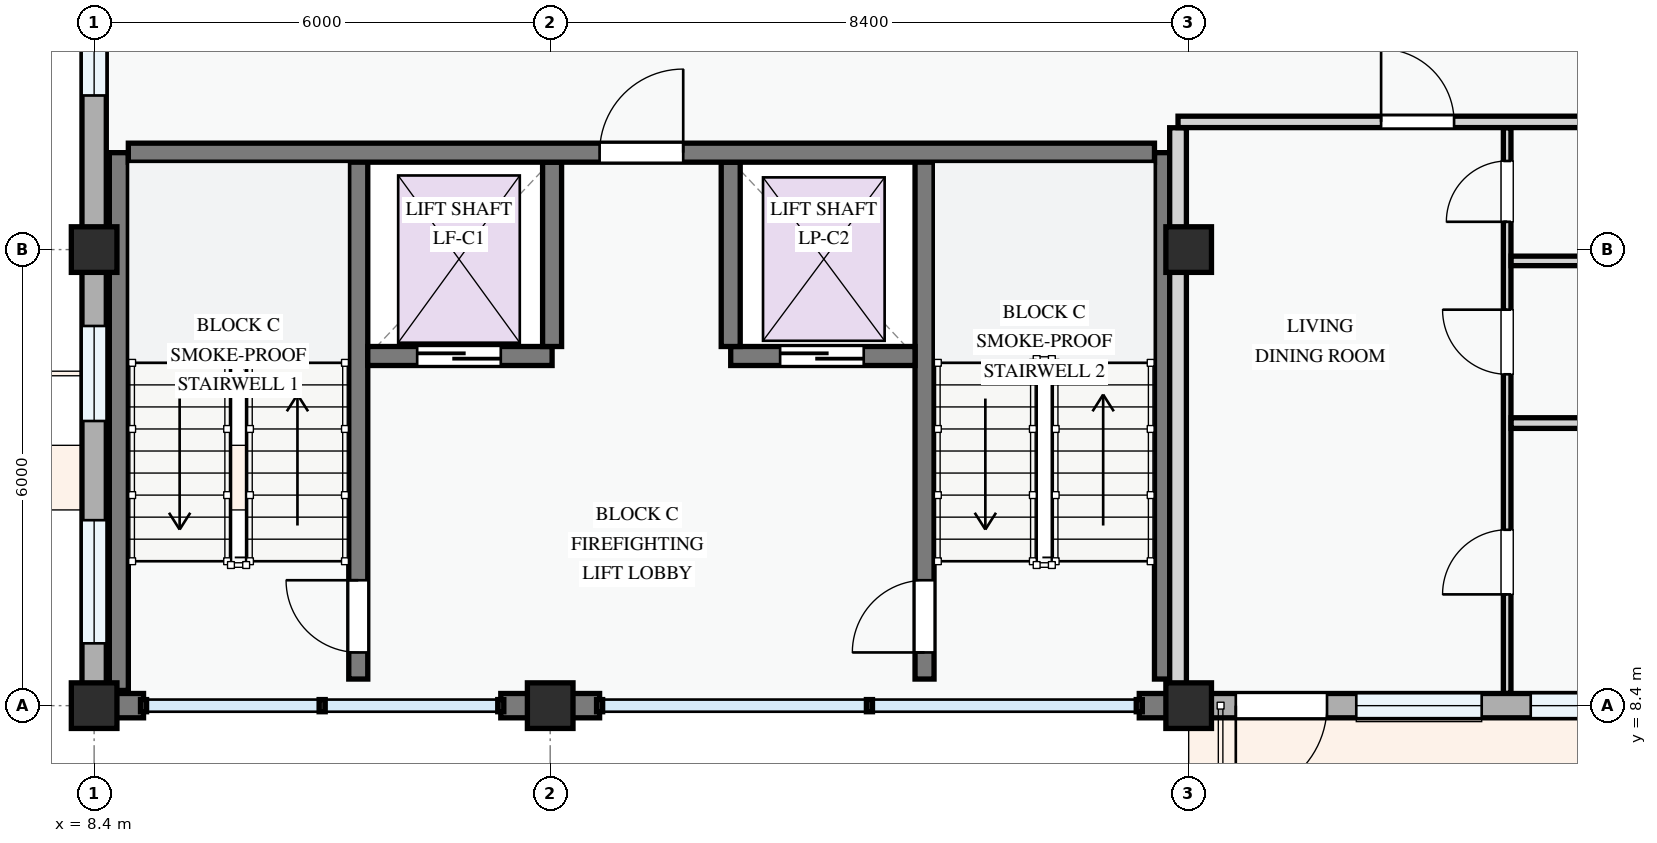
"""IFC4 building model, lengths in metres.
Left out: names, types, materials, properties, quantities, classifications, styles, units other than length and angle.
Written with IfcOpenShell. Run it as: python <this file> out.ifc"""

import sys

from ifc_helpers import new_model, si_unit, direction, frame, frame_2d, origin, origin_2d, place, context, subcontext, project, spatial, rectangle, extrude, element, fill, save


model = new_model("IFC4")
c1 = context("Model", 3, precision=1e-05, world=origin(), true_north=direction((0.0, 1.0)))
c2 = subcontext(c1, "Body", "Model", "MODEL_VIEW")
j1 = project(units=[si_unit("LENGTHUNIT", "METRE"), si_unit("PLANEANGLEUNIT", "RADIAN")], contexts=[c1])
p1 = place(None, origin())
s1 = spatial("IfcSite", under=j1, at=p1, CompositionType="ELEMENT")
p2 = place(p1, origin())
s2 = spatial("IfcBuilding", under=s1, at=p2, CompositionType="ELEMENT")
p3 = place(p2, frame((0.0, 0.0, 14.7)))
s3 = spatial("IfcBuildingStorey", under=s2, at=p3, CompositionType="ELEMENT", Elevation=14.7)
for number, where, z_axis, x_axis in (
    (1, (8.4, 8.4, 0.0), (0.0, 0.0, 1.0), (1.0, 0.0, 0.0)),
    (2, (8.4, 14.4, 0.0), (0.0, 0.0, 1.0), (1.0, 0.0, 0.0)),
    (3, (14.4, 8.4, 0.0), (0.0, 0.0, 1.0), (1.0, 0.0, 0.0)),
    (4, (22.8, 8.4, 0.0), (0.0, 0.0, 1.0), (1.0, 0.0, 0.0)),
    (5, (22.8, 14.4, 0.0), (0.0, 0.0, 1.0), (1.0, 0.0, 0.0)),
):
    element("IfcColumn", number, at=place(p3, frame(where, z_axis=z_axis, x_axis=x_axis)), inside=s3, PredefinedType="COLUMN", context=c2, shape_type="SweptSolid", body=[
        extrude(rectangle(XDim=0.6, YDim=0.6, at=origin_2d()), origin(), (0.0, 0.0, 1.0), 3.3),
    ])
p4 = place(p3, frame((8.4, 22.8, 0.0), z_axis=(0.0, 0.0, 1.0), x_axis=(0.0, -1.0, 0.0)))
e6 = element("IfcWall", 6, at=p4, inside=s3, PredefinedType="STANDARD", context=c2, shape_type="SweptSolid", body=[
    extrude(rectangle(XDim=8.4, YDim=0.32, at=frame_2d((4.2, 0.0))), origin(), (0.0, 0.0, 1.0), 2.345),
])
p5 = place(p4, frame((1.235, 0.0, 0.78)))
e7 = element("IfcOpeningElement", 7, at=p5, cuts=e6, PredefinedType="OPENING", context=c2, shape_type="SweptSolid", body=[
    extrude(rectangle(XDim=1.92, YDim=1.44, at=frame_2d((0.96, 0.72))), frame((0.0, 0.17, 0.0), z_axis=(0.0, -1.0, 0.0), x_axis=(1.0, 0.0, 0.0)), (0.0, 0.0, 1.0), 0.34),
])
p6 = place(p4, frame((4.952, 0.0, 0.78)))
e8 = element("IfcOpeningElement", 8, at=p6, cuts=e6, PredefinedType="OPENING", context=c2, shape_type="SweptSolid", body=[
    extrude(rectangle(XDim=1.42, YDim=1.38, at=frame_2d((0.71, 0.69))), frame((0.0, 0.17, 0.0), z_axis=(0.0, -1.0, 0.0), x_axis=(1.0, 0.0, 0.0)), (0.0, 0.0, 1.0), 0.34),
])
p7 = place(p3, frame((8.4, 14.4, 0.0), z_axis=(0.0, 0.0, 1.0), x_axis=(0.0, -1.0, 0.0)))
e9 = element("IfcWall", 9, at=p7, inside=s3, PredefinedType="STANDARD", context=c2, shape_type="SweptSolid", body=[
    extrude(rectangle(XDim=6.0, YDim=0.32, at=frame_2d((3.0, 0.0))), origin(), (0.0, 0.0, 1.0), 2.445),
])
p8 = place(p7, frame((1.005, 0.0, 0.78)))
e10 = element("IfcOpeningElement", 10, at=p8, cuts=e9, PredefinedType="OPENING", context=c2, shape_type="SweptSolid", body=[
    extrude(rectangle(XDim=1.25, YDim=1.45, at=frame_2d((0.625, 0.725))), frame((0.0, 0.17, 0.0), z_axis=(0.0, -1.0, 0.0), x_axis=(1.0, 0.0, 0.0)), (0.0, 0.0, 1.0), 0.34),
])
p9 = place(p7, frame((3.56, 0.0, 0.78)))
e11 = element("IfcOpeningElement", 11, at=p9, cuts=e9, PredefinedType="OPENING", context=c2, shape_type="SweptSolid", body=[
    extrude(rectangle(XDim=1.62, YDim=1.38, at=frame_2d((0.81, 0.69))), frame((0.0, 0.17, 0.0), z_axis=(0.0, -1.0, 0.0), x_axis=(1.0, 0.0, 0.0)), (0.0, 0.0, 1.0), 0.34),
])
p10 = place(p3, frame((8.562, 8.4, 0.0), z_axis=(0.0, 0.0, 1.0), x_axis=(1.0, 0.0, 0.0)))
e12 = element("IfcWall", 12, at=p10, inside=s3, PredefinedType="STANDARD", context=c2, shape_type="SweptSolid", body=[
    extrude(rectangle(XDim=0.488, YDim=0.32, at=frame_2d((0.244, 0.0))), origin(), (0.0, 0.0, 1.0), 3.04),
])
p11 = place(p3, frame((13.75, 8.4, 0.0), z_axis=(0.0, 0.0, 1.0), x_axis=(1.0, 0.0, 0.0)))
e13 = element("IfcWall", 13, at=p11, inside=s3, PredefinedType="STANDARD", context=c2, shape_type="SweptSolid", body=[
    extrude(rectangle(XDim=0.65, YDim=0.32, at=frame_2d((0.325, 0.0))), origin(), (0.0, 0.0, 1.0), 3.04),
])
for number, where, z_axis, x_axis in (
    (14, (14.4, 8.4, 0.0), (0.0, 0.0, 1.0), (1.0, 0.0, 0.0)),
    (15, (22.15, 8.4, 0.0), (0.0, 0.0, 1.0), (1.0, 0.0, 0.0)),
):
    element("IfcWall", number, at=place(p3, frame(where, z_axis=z_axis, x_axis=x_axis)), inside=s3, PredefinedType="STANDARD", context=c2, shape_type="SweptSolid", body=[
        extrude(rectangle(XDim=0.65, YDim=0.32, at=frame_2d((0.325, 0.0))), origin(), (0.0, 0.0, 1.0), 3.04),
    ])
p12 = place(p3, frame((22.8, 8.4, 0.0), z_axis=(0.0, 0.0, 1.0), x_axis=(1.0, 0.0, 0.0)))
e16 = element("IfcWall", 16, at=p12, inside=s3, PredefinedType="STANDARD", context=c2, shape_type="SweptSolid", body=[
    extrude(rectangle(XDim=6.0, YDim=0.32, at=frame_2d((3.0, 0.0))), origin(), (0.0, 0.0, 1.0), 2.475),
])
p13 = place(p12, frame((0.62, 0.0, 0.0)))
e17 = element("IfcOpeningElement", 17, at=p13, cuts=e16, PredefinedType="OPENING", context=c2, shape_type="SweptSolid", body=[
    extrude(rectangle(XDim=1.2, YDim=2.15, at=frame_2d((0.6, 1.075))), frame((0.0, 0.17, 0.0), z_axis=(0.0, -1.0, 0.0), x_axis=(1.0, 0.0, 0.0)), (0.0, 0.0, 1.0), 0.34),
])
p14 = place(p12, frame((2.205, 0.0, 0.78)))
e18 = element("IfcOpeningElement", 18, at=p14, cuts=e16, PredefinedType="OPENING", context=c2, shape_type="SweptSolid", body=[
    extrude(rectangle(XDim=1.65, YDim=1.5, at=frame_2d((0.825, 0.75))), frame((0.0, 0.17, 0.0), z_axis=(0.0, -1.0, 0.0), x_axis=(1.0, 0.0, 0.0)), (0.0, 0.0, 1.0), 0.34),
])
p15 = place(p12, frame((4.5, 0.0, 0.78)))
e19 = element("IfcOpeningElement", 19, at=p15, cuts=e16, PredefinedType="OPENING", context=c2, shape_type="SweptSolid", body=[
    extrude(rectangle(XDim=1.0, YDim=1.25, at=frame_2d((0.5, 0.625))), frame((0.0, 0.17, 0.0), z_axis=(0.0, -1.0, 0.0), x_axis=(1.0, 0.0, 0.0)), (0.0, 0.0, 1.0), 0.34),
])
p16 = place(p3, frame((11.875, 8.75, 0.0), z_axis=(0.0, 0.0, 1.0), x_axis=(0.0, 1.0, 0.0)))
e20 = element("IfcWall", 20, at=p16, inside=s3, PredefinedType="SHEAR", context=c2, shape_type="SweptSolid", body=[
    extrude(rectangle(XDim=6.925, YDim=0.25, at=frame_2d((3.462, 0.0))), origin(), (0.0, 0.0, 1.0), 3.0),
])
p17 = place(p16, frame((0.35, 0.0, 0.0)))
e21 = element("IfcOpeningElement", 21, at=p17, cuts=e20, PredefinedType="OPENING", context=c2, shape_type="SweptSolid", body=[
    extrude(rectangle(XDim=0.95, YDim=2.1, at=frame_2d((0.475, 1.05))), frame((0.0, 0.135, 0.0), z_axis=(0.0, -1.0, 0.0), x_axis=(1.0, 0.0, 0.0)), (0.0, 0.0, 1.0), 0.27),
])
p18 = place(p3, frame((8.725, 8.6, 0.0), z_axis=(0.0, 0.0, 1.0), x_axis=(0.0, 1.0, 0.0)))
e22 = element("IfcWall", 22, at=p18, inside=s3, PredefinedType="SHEAR", context=c2, shape_type="SweptSolid", body=[
    extrude(rectangle(XDim=7.075, YDim=0.25, at=frame_2d((3.538, 0.0))), origin(), (0.0, 0.0, 1.0), 3.0),
])
p19 = place(p3, frame((22.475, 8.75, 0.0), z_axis=(0.0, 0.0, 1.0), x_axis=(0.0, 1.0, 0.0)))
e23 = element("IfcWall", 23, at=p19, inside=s3, PredefinedType="SHEAR", context=c2, shape_type="SweptSolid", body=[
    extrude(rectangle(XDim=6.925, YDim=0.25, at=frame_2d((3.462, 0.0))), origin(), (0.0, 0.0, 1.0), 3.0),
])
p20 = place(p3, frame((19.325, 8.75, 0.0), z_axis=(0.0, 0.0, 1.0), x_axis=(0.0, 1.0, 0.0)))
e24 = element("IfcWall", 24, at=p20, inside=s3, PredefinedType="SHEAR", context=c2, shape_type="SweptSolid", body=[
    extrude(rectangle(XDim=6.925, YDim=0.25, at=frame_2d((3.462, 0.0))), origin(), (0.0, 0.0, 1.0), 3.0),
])
p21 = place(p20, frame((0.35, 0.0, 0.0)))
e25 = element("IfcOpeningElement", 25, at=p21, cuts=e24, PredefinedType="OPENING", context=c2, shape_type="SweptSolid", body=[
    extrude(rectangle(XDim=0.95, YDim=2.1, at=frame_2d((0.475, 1.05))), frame((0.0, 0.135, 0.0), z_axis=(0.0, -1.0, 0.0), x_axis=(1.0, 0.0, 0.0)), (0.0, 0.0, 1.0), 0.27),
])
p22 = place(p3, frame((12.0, 13.0, 0.0), z_axis=(0.0, 0.0, 1.0), x_axis=(1.0, 0.0, 0.0)))
e26 = element("IfcWall", 26, at=p22, inside=s3, PredefinedType="SHEAR", context=c2, shape_type="SweptSolid", body=[
    extrude(rectangle(XDim=2.425, YDim=0.25, at=frame_2d((1.212, 0.0))), origin(), (0.0, 0.0, 1.0), 3.0),
])
p23 = place(p22, frame((0.65, 0.0, 0.0)))
e27 = element("IfcOpeningElement", 27, at=p23, cuts=e26, PredefinedType="OPENING", context=c2, shape_type="SweptSolid", body=[
    extrude(rectangle(XDim=1.1, YDim=2.15, at=frame_2d((0.55, 1.075))), frame((0.0, 0.135, 0.0), z_axis=(0.0, -1.0, 0.0), x_axis=(1.0, 0.0, 0.0)), (0.0, 0.0, 1.0), 0.27),
])
p24 = place(p3, frame((16.775, 13.0, 0.0), z_axis=(0.0, 0.0, 1.0), x_axis=(1.0, 0.0, 0.0)))
e28 = element("IfcWall", 28, at=p24, inside=s3, PredefinedType="SHEAR", context=c2, shape_type="SweptSolid", body=[
    extrude(rectangle(XDim=2.425, YDim=0.25, at=frame_2d((1.212, 0.0))), origin(), (0.0, 0.0, 1.0), 3.0),
])
p25 = place(p24, frame((0.65, 0.0, 0.0)))
e29 = element("IfcOpeningElement", 29, at=p25, cuts=e28, PredefinedType="OPENING", context=c2, shape_type="SweptSolid", body=[
    extrude(rectangle(XDim=1.1, YDim=2.15, at=frame_2d((0.55, 1.075))), frame((0.0, 0.135, 0.0), z_axis=(0.0, -1.0, 0.0), x_axis=(1.0, 0.0, 0.0)), (0.0, 0.0, 1.0), 0.27),
])
for number, where, z_axis, x_axis in (
    (30, (14.425, 13.125, 0.0), (0.0, 0.0, 1.0), (0.0, 1.0, 0.0)),
    (31, (16.775, 13.125, 0.0), (0.0, 0.0, 1.0), (0.0, 1.0, 0.0)),
):
    element("IfcWall", number, at=place(p3, frame(where, z_axis=z_axis, x_axis=x_axis)), inside=s3, PredefinedType="SHEAR", context=c2, shape_type="SweptSolid", body=[
        extrude(rectangle(XDim=2.425, YDim=0.25, at=frame_2d((1.212, 0.0))), origin(), (0.0, 0.0, 1.0), 3.0),
    ])
p26 = place(p3, frame((8.85, 15.675, 0.0), z_axis=(0.0, 0.0, 1.0), x_axis=(1.0, 0.0, 0.0)))
e32 = element("IfcWall", 32, at=p26, inside=s3, PredefinedType="SHEAR", context=c2, shape_type="SweptSolid", body=[
    extrude(rectangle(XDim=13.5, YDim=0.25, at=frame_2d((6.75, 0.0))), origin(), (0.0, 0.0, 1.0), 3.0),
])
p27 = place(p26, frame((6.2, 0.0, 0.0)))
e33 = element("IfcOpeningElement", 33, at=p27, cuts=e32, PredefinedType="OPENING", context=c2, shape_type="SweptSolid", body=[
    extrude(rectangle(XDim=1.1, YDim=2.15, at=frame_2d((0.55, 1.075))), frame((0.0, 0.135, 0.0), z_axis=(0.0, -1.0, 0.0), x_axis=(1.0, 0.0, 0.0)), (0.0, 0.0, 1.0), 0.27),
])
p28 = place(p3, frame((26.99, 8.562, 0.0), z_axis=(0.0, 0.0, 1.0), x_axis=(0.0, 1.0, 0.0)))
e34 = element("IfcWall", 34, at=p28, inside=s3, PredefinedType="PARTITIONING", context=c2, shape_type="SweptSolid", body=[
    extrude(rectangle(XDim=7.441, YDim=0.1, at=frame_2d((3.72, 0.0))), origin(), (0.0, 0.0, 1.0), 3.0),
])
p29 = place(p28, frame((1.302, 0.0, 0.0)))
e35 = element("IfcOpeningElement", 35, at=p29, cuts=e34, PredefinedType="OPENING", context=c2, shape_type="SweptSolid", body=[
    extrude(rectangle(XDim=0.85, YDim=2.1, at=frame_2d((0.425, 1.05))), frame((0.0, 0.06, 0.0), z_axis=(0.0, -1.0, 0.0), x_axis=(1.0, 0.0, 0.0)), (0.0, 0.0, 1.0), 0.12),
])
p30 = place(p28, frame((4.198, 0.0, 0.0)))
e36 = element("IfcOpeningElement", 36, at=p30, cuts=e34, PredefinedType="OPENING", context=c2, shape_type="SweptSolid", body=[
    extrude(rectangle(XDim=0.85, YDim=2.1, at=frame_2d((0.425, 1.05))), frame((0.0, 0.06, 0.0), z_axis=(0.0, -1.0, 0.0), x_axis=(1.0, 0.0, 0.0)), (0.0, 0.0, 1.0), 0.12),
])
p31 = place(p28, frame((6.204, 0.0, 0.0)))
e37 = element("IfcOpeningElement", 37, at=p31, cuts=e34, PredefinedType="OPENING", context=c2, shape_type="SweptSolid", body=[
    extrude(rectangle(XDim=0.8, YDim=2.1, at=frame_2d((0.4, 1.05))), frame((0.0, 0.06, 0.0), z_axis=(0.0, -1.0, 0.0), x_axis=(1.0, 0.0, 0.0)), (0.0, 0.0, 1.0), 0.12),
])
p32 = place(p3, frame((27.042, 12.118, 0.0), z_axis=(0.0, 0.0, 1.0), x_axis=(1.0, 0.0, 0.0)))
e38 = element("IfcWall", 38, at=p32, inside=s3, PredefinedType="PARTITIONING", context=c2, shape_type="SweptSolid", body=[
    extrude(rectangle(XDim=5.976, YDim=0.14, at=frame_2d((2.988, 0.0))), origin(), (0.0, 0.0, 1.0), 3.0),
])
p33 = place(p3, frame((27.042, 14.251, 0.0), z_axis=(0.0, 0.0, 1.0), x_axis=(1.0, 0.0, 0.0)))
e39 = element("IfcWall", 39, at=p33, inside=s3, PredefinedType="PARTITIONING", context=c2, shape_type="SweptSolid", body=[
    extrude(rectangle(XDim=5.976, YDim=0.125, at=frame_2d((2.988, 0.0))), origin(), (0.0, 0.0, 1.0), 2.375),
])
p34 = place(p3, frame((22.66, 8.562, 0.0), z_axis=(0.0, 0.0, 1.0), x_axis=(0.0, 1.0, 0.0)))
e40 = element("IfcWall", 40, at=p34, inside=s3, PredefinedType="PARTITIONING", context=c2, shape_type="SweptSolid", body=[
    extrude(rectangle(XDim=7.441, YDim=0.22, at=frame_2d((3.72, 0.0))), origin(), (0.0, 0.0, 1.0), 2.425),
])
p35 = place(p3, frame((22.66, 16.08, 0.0), z_axis=(0.0, 0.0, 1.0), x_axis=(1.0, 0.0, 0.0)))
e41 = element("IfcWall", 41, at=p35, inside=s3, PredefinedType="PARTITIONING", context=c2, shape_type="SweptSolid", body=[
    extrude(rectangle(XDim=34.778, YDim=0.15, at=frame_2d((17.389, 0.0))), origin(), (0.0, 0.0, 1.0), 3.0),
])
p36 = place(p35, frame((2.672, 0.0, 0.0)))
e42 = element("IfcOpeningElement", 42, at=p36, cuts=e41, PredefinedType="OPENING", context=c2, shape_type="SweptSolid", body=[
    extrude(rectangle(XDim=0.96, YDim=2.12, at=frame_2d((0.48, 1.06))), frame((0.0, 0.085, 0.0), z_axis=(0.0, -1.0, 0.0), x_axis=(1.0, 0.0, 0.0)), (0.0, 0.0, 1.0), 0.17),
])
p37 = place(p35, frame((10.71, 0.0, 0.0)))
e43 = element("IfcOpeningElement", 43, at=p37, cuts=e41, PredefinedType="OPENING", context=c2, shape_type="SweptSolid", body=[
    extrude(rectangle(XDim=0.92, YDim=2.1, at=frame_2d((0.46, 1.05))), frame((0.0, 0.085, 0.0), z_axis=(0.0, -1.0, 0.0), x_axis=(1.0, 0.0, 0.0)), (0.0, 0.0, 1.0), 0.17),
])
p38 = place(p35, frame((24.28, 0.0, 0.0)))
e44 = element("IfcOpeningElement", 44, at=p38, cuts=e41, PredefinedType="OPENING", context=c2, shape_type="SweptSolid", body=[
    extrude(rectangle(XDim=0.92, YDim=2.1, at=frame_2d((0.46, 1.05))), frame((0.0, 0.085, 0.0), z_axis=(0.0, -1.0, 0.0), x_axis=(1.0, 0.0, 0.0)), (0.0, 0.0, 1.0), 0.17),
])
p39 = place(p6, origin())
e45 = element("IfcWindow", 45, at=p39, inside=s3, PartitioningType="SINGLE_PANEL", PredefinedType="WINDOW", context=c2, shape_type="SweptSolid", body=[
    extrude(rectangle(XDim=1.42, YDim=1.38, at=frame_2d((0.71, 0.69))), frame((0.0, 0.03, 0.0), z_axis=(0.0, -1.0, 0.0), x_axis=(1.0, 0.0, 0.0)), (0.0, 0.0, 1.0), 0.06),
])
fill(e8, e45)
p40 = place(p8, origin())
e46 = element("IfcWindow", 46, at=p40, inside=s3, PartitioningType="SINGLE_PANEL", PredefinedType="WINDOW", context=c2, shape_type="SweptSolid", body=[
    extrude(rectangle(XDim=1.25, YDim=1.45, at=frame_2d((0.625, 0.725))), frame((0.0, 0.03, 0.0), z_axis=(0.0, -1.0, 0.0), x_axis=(1.0, 0.0, 0.0)), (0.0, 0.0, 1.0), 0.06),
])
fill(e10, e46)
p41 = place(p9, origin())
e47 = element("IfcWindow", 47, at=p41, inside=s3, PartitioningType="DOUBLE_PANEL_VERTICAL", PredefinedType="WINDOW", context=c2, shape_type="SweptSolid", body=[
    extrude(rectangle(XDim=1.62, YDim=1.38, at=frame_2d((0.81, 0.69))), frame((0.0, 0.03, 0.0), z_axis=(0.0, -1.0, 0.0), x_axis=(1.0, 0.0, 0.0)), (0.0, 0.0, 1.0), 0.06),
])
fill(e11, e47)
p42 = place(p13, frame((1.2, 0.0, 0.0), z_axis=(0.0, 0.0, 1.0), x_axis=(-1.0, 0.0, 0.0)))
e48 = element("IfcDoor", 48, at=p42, inside=s3, OperationType="SINGLE_SWING_RIGHT", PredefinedType="DOOR", context=c2, shape_type="SweptSolid", body=[
    extrude(rectangle(XDim=1.2, YDim=2.15, at=frame_2d((0.6, 1.075))), frame((0.0, 0.025, 0.0), z_axis=(0.0, -1.0, 0.0), x_axis=(1.0, 0.0, 0.0)), (0.0, 0.0, 1.0), 0.05),
])
fill(e17, e48)
p43 = place(p14, origin())
e49 = element("IfcWindow", 49, at=p43, inside=s3, PartitioningType="DOUBLE_PANEL_VERTICAL", PredefinedType="WINDOW", context=c2, shape_type="SweptSolid", body=[
    extrude(rectangle(XDim=1.65, YDim=1.5, at=frame_2d((0.825, 0.75))), frame((0.0, 0.03, 0.0), z_axis=(0.0, -1.0, 0.0), x_axis=(1.0, 0.0, 0.0)), (0.0, 0.0, 1.0), 0.06),
])
fill(e18, e49)
p44 = place(p15, origin())
e50 = element("IfcWindow", 50, at=p44, inside=s3, PartitioningType="SINGLE_PANEL", PredefinedType="WINDOW", context=c2, shape_type="SweptSolid", body=[
    extrude(rectangle(XDim=1.0, YDim=1.25, at=frame_2d((0.5, 0.625))), frame((0.0, 0.03, 0.0), z_axis=(0.0, -1.0, 0.0), x_axis=(1.0, 0.0, 0.0)), (0.0, 0.0, 1.0), 0.06),
])
fill(e19, e50)
p45 = place(p17, origin())
e51 = element("IfcDoor", 51, at=p45, inside=s3, OperationType="SINGLE_SWING_RIGHT", PredefinedType="DOOR", context=c2, shape_type="SweptSolid", body=[
    extrude(rectangle(XDim=0.95, YDim=2.1, at=frame_2d((0.475, 1.05))), frame((0.0, 0.025, 0.0), z_axis=(0.0, -1.0, 0.0), x_axis=(1.0, 0.0, 0.0)), (0.0, 0.0, 1.0), 0.05),
])
fill(e21, e51)
p46 = place(p21, origin())
e52 = element("IfcDoor", 52, at=p46, inside=s3, OperationType="SINGLE_SWING_LEFT", PredefinedType="DOOR", context=c2, shape_type="SweptSolid", body=[
    extrude(rectangle(XDim=0.95, YDim=2.1, at=frame_2d((0.475, 1.05))), frame((0.0, 0.025, 0.0), z_axis=(0.0, -1.0, 0.0), x_axis=(1.0, 0.0, 0.0)), (0.0, 0.0, 1.0), 0.05),
])
fill(e25, e52)
p47 = place(p23, origin())
e53 = element("IfcDoor", 53, at=p47, inside=s3, OperationType="SLIDING_TO_LEFT", PredefinedType="DOOR", context=c2, shape_type="SweptSolid", body=[
    extrude(rectangle(XDim=1.1, YDim=2.15, at=frame_2d((0.55, 1.075))), frame((0.0, 0.025, 0.0), z_axis=(0.0, -1.0, 0.0), x_axis=(1.0, 0.0, 0.0)), (0.0, 0.0, 1.0), 0.05),
])
fill(e27, e53)
p48 = place(p25, origin())
e54 = element("IfcDoor", 54, at=p48, inside=s3, OperationType="SLIDING_TO_LEFT", PredefinedType="DOOR", context=c2, shape_type="SweptSolid", body=[
    extrude(rectangle(XDim=1.1, YDim=2.15, at=frame_2d((0.55, 1.075))), frame((0.0, 0.025, 0.0), z_axis=(0.0, -1.0, 0.0), x_axis=(1.0, 0.0, 0.0)), (0.0, 0.0, 1.0), 0.05),
])
fill(e29, e54)
p49 = place(p27, origin())
e55 = element("IfcDoor", 55, at=p49, inside=s3, OperationType="SINGLE_SWING_RIGHT", PredefinedType="DOOR", context=c2, shape_type="SweptSolid", body=[
    extrude(rectangle(XDim=1.1, YDim=2.15, at=frame_2d((0.55, 1.075))), frame((0.0, 0.025, 0.0), z_axis=(0.0, -1.0, 0.0), x_axis=(1.0, 0.0, 0.0)), (0.0, 0.0, 1.0), 0.05),
])
fill(e33, e55)
p50 = place(p29, origin())
e56 = element("IfcDoor", 56, at=p50, inside=s3, OperationType="SINGLE_SWING_LEFT", PredefinedType="DOOR", context=c2, shape_type="SweptSolid", body=[
    extrude(rectangle(XDim=0.85, YDim=2.1, at=frame_2d((0.425, 1.05))), frame((0.0, 0.025, 0.0), z_axis=(0.0, -1.0, 0.0), x_axis=(1.0, 0.0, 0.0)), (0.0, 0.0, 1.0), 0.05),
])
fill(e35, e56)
p51 = place(p30, origin())
e57 = element("IfcDoor", 57, at=p51, inside=s3, OperationType="SINGLE_SWING_RIGHT", PredefinedType="DOOR", context=c2, shape_type="SweptSolid", body=[
    extrude(rectangle(XDim=0.85, YDim=2.1, at=frame_2d((0.425, 1.05))), frame((0.0, 0.025, 0.0), z_axis=(0.0, -1.0, 0.0), x_axis=(1.0, 0.0, 0.0)), (0.0, 0.0, 1.0), 0.05),
])
fill(e36, e57)
p52 = place(p31, origin())
e58 = element("IfcDoor", 58, at=p52, inside=s3, OperationType="SINGLE_SWING_LEFT", PredefinedType="DOOR", context=c2, shape_type="SweptSolid", body=[
    extrude(rectangle(XDim=0.8, YDim=2.1, at=frame_2d((0.4, 1.05))), frame((0.0, 0.025, 0.0), z_axis=(0.0, -1.0, 0.0), x_axis=(1.0, 0.0, 0.0)), (0.0, 0.0, 1.0), 0.05),
])
fill(e37, e58)
p53 = place(p36, origin())
e59 = element("IfcDoor", 59, at=p53, inside=s3, OperationType="SINGLE_SWING_LEFT", PredefinedType="DOOR", context=c2, shape_type="SweptSolid", body=[
    extrude(rectangle(XDim=0.96, YDim=2.12, at=frame_2d((0.48, 1.06))), frame((0.0, 0.025, 0.0), z_axis=(0.0, -1.0, 0.0), x_axis=(1.0, 0.0, 0.0)), (0.0, 0.0, 1.0), 0.05),
])
fill(e42, e59)
save(model, sys.argv[1])
